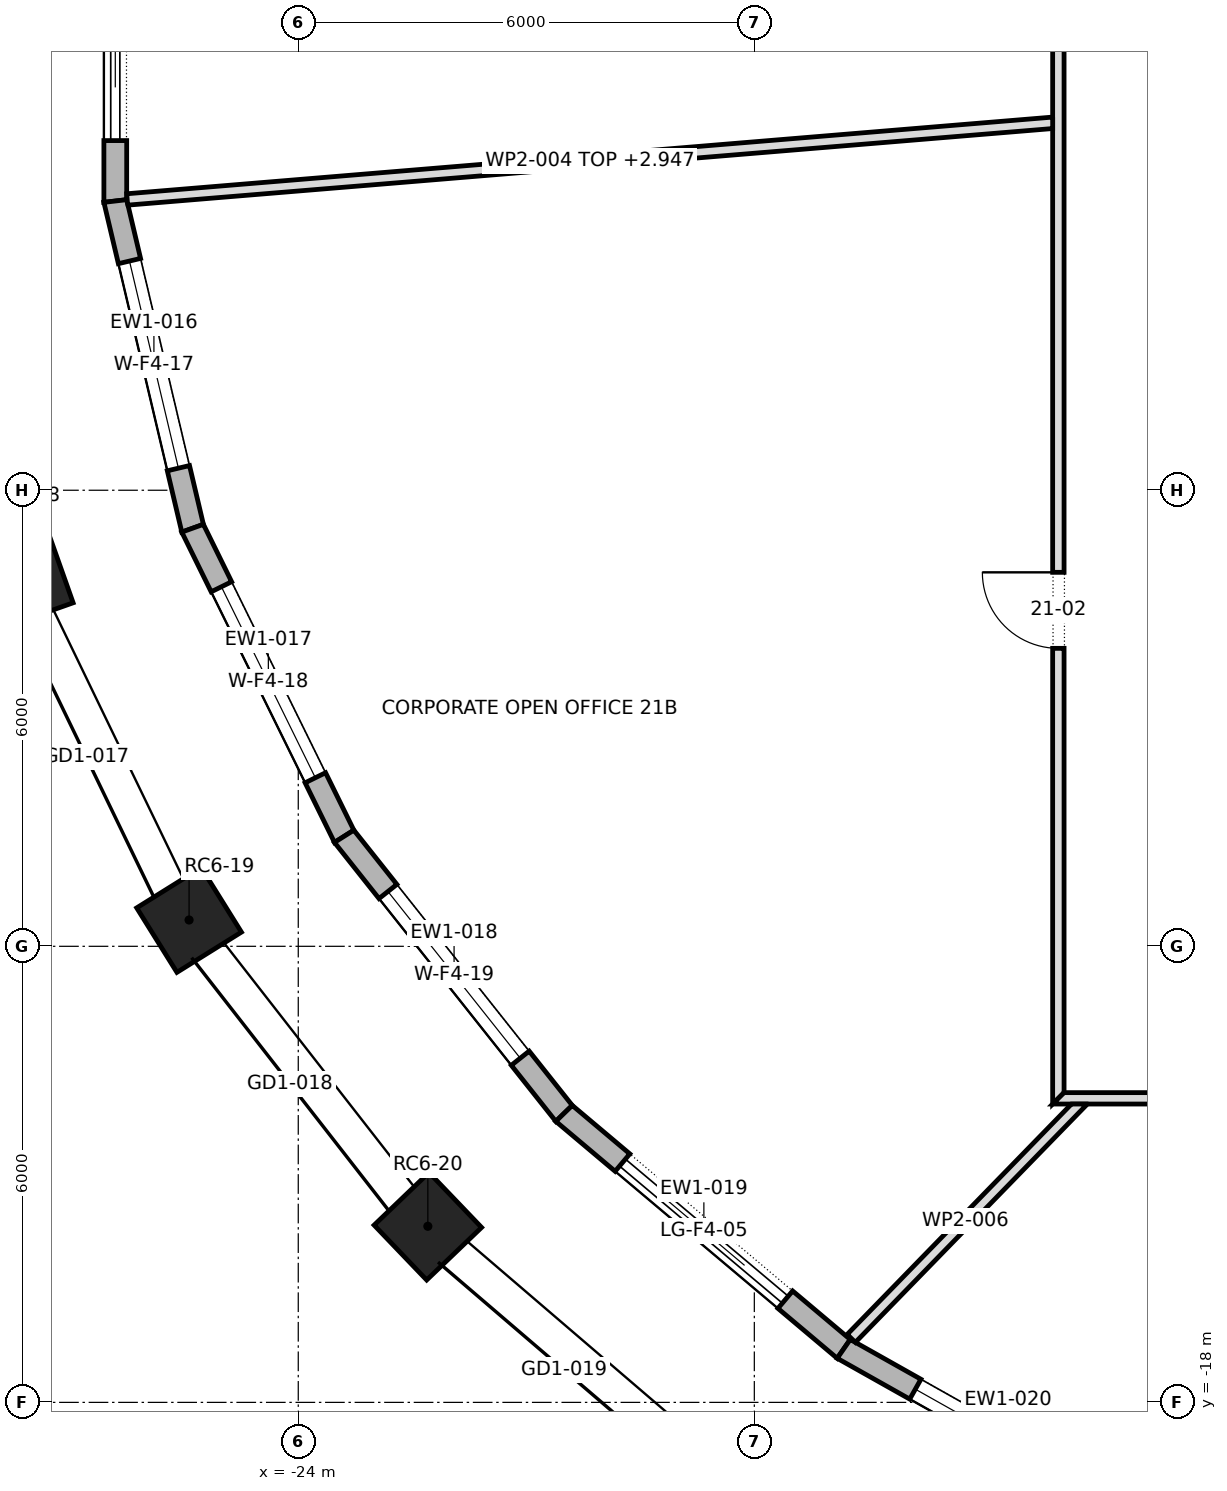
"""IFC4 building model, lengths in metres.
Left out: names, types, materials, properties, quantities, classifications, styles, units other than length and angle.
Written with IfcOpenShell. Run it as: python <this file> out.ifc"""

import sys

from ifc_helpers import new_model, si_unit, direction, frame, frame_2d, origin, origin_2d, place, context, subcontext, project, spatial, polyline, rectangle, outline, extrude, element, fill, save


model = new_model("IFC4")
c1 = context("Model", 3, precision=1e-05, world=origin(), true_north=direction((0.0, 1.0)))
c2 = subcontext(c1, "Body", "Model", "MODEL_VIEW")
j1 = project(units=[si_unit("LENGTHUNIT", "METRE"), si_unit("PLANEANGLEUNIT", "RADIAN")], contexts=[c1])
p1 = place(None, origin())
s1 = spatial("IfcSite", under=j1, at=p1, CompositionType="ELEMENT")
p2 = place(p1, origin())
s2 = spatial("IfcBuilding", under=s1, at=p2, CompositionType="ELEMENT")
p3 = place(p2, frame((0.0, 0.0, 300.3)))
s3 = spatial("IfcBuildingStorey", under=s2, at=p3, CompositionType="ELEMENT", Elevation=300.3)
for number, where, z_axis, x_axis in (
    (1, (-27.6, -7.177, 0.0), (0.0, 0.0, 1.0), (0.334, -0.943, 0.0)),
    (2, (-25.437, -11.654, 0.0), (0.0, 0.0, 1.0), (0.529, -0.849, 0.0)),
    (3, (-22.295, -15.683, 0.0), (0.0, 0.0, 1.0), (0.692, -0.722, 0.0)),
):
    element("IfcColumn", number, at=place(p3, frame(where, z_axis=z_axis, x_axis=x_axis)), inside=s3, PredefinedType="COLUMN", context=c2, shape_type="SweptSolid", body=[
        extrude(rectangle(XDim=1.0, YDim=1.0, at=origin_2d()), origin(), (0.0, 0.0, 1.0), 4.0),
    ])
p4 = place(p3, frame((-26.407, 2.195, 0.0), z_axis=(0.0, 0.0, 1.0), x_axis=(0.0, -1.0, 0.0)))
e4 = element("IfcWall", 4, at=p4, inside=s3, PredefinedType="STANDARD", context=c2, shape_type="SweptSolid", body=[
    extrude(outline(polyline([(-0.018, -0.15), (4.408, -0.15), (4.373, 0.15), (0.018, 0.15), (-0.018, -0.15)])), origin(), (0.0, 0.0, 1.0), 3.7),
])
p5 = place(p4, frame((0.795, 0.0, 0.0)))
e5 = element("IfcOpeningElement", 5, at=p5, cuts=e4, PredefinedType="OPENING", context=c2, shape_type="SweptSolid", body=[
    extrude(rectangle(XDim=2.8, YDim=3.25, at=frame_2d((1.4, 1.625))), frame((0.0, 0.162, 0.0), z_axis=(0.0, -1.0, 0.0), x_axis=(1.0, 0.0, 0.0)), (0.0, 0.0, 1.0), 0.324),
])
p6 = place(p3, frame((-26.407, -2.195, 0.0), z_axis=(0.0, 0.0, 1.0), x_axis=(0.229943714271, -0.973203929435, 0.0)))
e6 = element("IfcWall", 6, at=p6, inside=s3, PredefinedType="STANDARD", context=c2, shape_type="SweptSolid", body=[
    extrude(outline(polyline([(-0.018, -0.15), (4.44, -0.15), (4.406, 0.15), (0.018, 0.15), (-0.018, -0.15)])), origin(), (0.0, 0.0, 1.0), 3.7),
])
p7 = place(p6, frame((0.812, 0.0, 0.6)))
e7 = element("IfcOpeningElement", 7, at=p7, cuts=e6, PredefinedType="OPENING", context=c2, shape_type="SweptSolid", body=[
    extrude(rectangle(XDim=2.8, YDim=2.65, at=frame_2d((1.4, 1.325))), frame((0.0, 0.162, 0.0), z_axis=(0.0, -1.0, 0.0), x_axis=(1.0, 0.0, 0.0)), (0.0, 0.0, 1.0), 0.324),
])
p8 = place(p3, frame((-25.39, -6.5, 0.0), z_axis=(0.0, 0.0, 1.0), x_axis=(0.441431671743, -0.897294867467, 0.0)))
e8 = element("IfcWall", 8, at=p8, inside=s3, PredefinedType="STANDARD", context=c2, shape_type="SweptSolid", body=[
    extrude(outline(polyline([(-0.017, -0.15), (4.533, -0.15), (4.501, 0.15), (0.017, 0.15), (-0.017, -0.15)])), origin(), (0.0, 0.0, 1.0), 3.7),
])
p9 = place(p8, frame((0.858, 0.0, 0.6)))
e9 = element("IfcOpeningElement", 9, at=p9, cuts=e8, PredefinedType="OPENING", context=c2, shape_type="SweptSolid", body=[
    extrude(rectangle(XDim=2.8, YDim=2.65, at=frame_2d((1.4, 1.325))), frame((0.0, 0.162, 0.0), z_axis=(0.0, -1.0, 0.0), x_axis=(1.0, 0.0, 0.0)), (0.0, 0.0, 1.0), 0.324),
])
p10 = place(p3, frame((-23.396, -10.553, 0.0), z_axis=(0.0, 0.0, 1.0), x_axis=(0.621625671247, -0.783314448256, 0.0)))
e10 = element("IfcWall", 10, at=p10, inside=s3, PredefinedType="STANDARD", context=c2, shape_type="SweptSolid", body=[
    extrude(outline(polyline([(-0.016, -0.15), (4.669, -0.15), (4.638, 0.15), (0.016, 0.15), (-0.016, -0.15)])), origin(), (0.0, 0.0, 1.0), 3.7),
])
p11 = place(p10, frame((0.927, 0.0, 0.6)))
e11 = element("IfcOpeningElement", 11, at=p11, cuts=e10, PredefinedType="OPENING", context=c2, shape_type="SweptSolid", body=[
    extrude(rectangle(XDim=2.8, YDim=2.65, at=frame_2d((1.4, 1.325))), frame((0.0, 0.162, 0.0), z_axis=(0.0, -1.0, 0.0), x_axis=(1.0, 0.0, 0.0)), (0.0, 0.0, 1.0), 0.324),
])
p12 = place(p3, frame((-20.503, -14.198, 0.0), z_axis=(0.0, 0.0, 1.0), x_axis=(0.764966473721, -0.644070100286, 0.0)))
e12 = element("IfcWall", 12, at=p12, inside=s3, PredefinedType="STANDARD", context=c2, shape_type="SweptSolid", body=[
    extrude(outline(polyline([(-0.015, -0.15), (4.824, -0.15), (4.796, 0.15), (0.015, 0.15), (-0.015, -0.15)])), origin(), (0.0, 0.0, 1.0), 3.7),
])
p13 = place(p12, frame((1.005, 0.0, 0.0)))
e13 = element("IfcOpeningElement", 13, at=p13, cuts=e12, PredefinedType="OPENING", context=c2, shape_type="SweptSolid", body=[
    extrude(rectangle(XDim=2.8, YDim=3.25, at=frame_2d((1.4, 1.625))), frame((0.0, 0.162, 0.0), z_axis=(0.0, -1.0, 0.0), x_axis=(1.0, 0.0, 0.0)), (0.0, 0.0, 1.0), 0.324),
])
p14 = place(p3, frame((-16.824, -17.296, 0.0), z_axis=(0.0, 0.0, 1.0), x_axis=(0.871512454536, -0.490373369575, 0.0)))
e14 = element("IfcWall", 14, at=p14, inside=s3, PredefinedType="STANDARD", context=c2, shape_type="SweptSolid", body=[
    extrude(outline(polyline([(-0.014, -0.15), (4.975, -0.15), (4.948, 0.15), (0.014, 0.15), (-0.014, -0.15)])), origin(), (0.0, 0.0, 1.0), 3.7),
])
p15 = place(p14, frame((1.081, 0.0, 0.6)))
e15 = element("IfcOpeningElement", 15, at=p15, cuts=e14, PredefinedType="OPENING", context=c2, shape_type="SweptSolid", body=[
    extrude(rectangle(XDim=2.8, YDim=2.65, at=frame_2d((1.4, 1.325))), frame((0.0, 0.162, 0.0), z_axis=(0.0, -1.0, 0.0), x_axis=(1.0, 0.0, 0.0)), (0.0, 0.0, 1.0), 0.324),
])
p16 = place(p3, frame((-14.0, -14.075, 0.0), z_axis=(0.0, 0.0, 1.0), x_axis=(0.0, 1.0, 0.0)))
e16 = element("IfcWall", 16, at=p16, inside=s3, PredefinedType="PARTITIONING", context=c2, shape_type="SweptSolid", body=[
    extrude(outline(polyline([(0.15, -0.075), (2.139, -0.075), (4.128, -0.075), (6.118, -0.075), (8.107, -0.075), (10.096, -0.075), (12.086, -0.075), (14.075, -0.075), (16.064, -0.075), (18.053, -0.075), (20.043, -0.075), (22.032, -0.075), (24.021, -0.075), (26.011, -0.075), (28.0, -0.075), (28.15, 0.075), (26.273, 0.075), (24.396, 0.075), (22.52, 0.075), (20.643, 0.075), (18.767, 0.075), (16.89, 0.075), (15.013, 0.075), (13.137, 0.075), (11.26, 0.075), (9.383, 0.075), (7.507, 0.075), (5.63, 0.075), (3.753, 0.075), (1.877, 0.075), (0.0, 0.075), (0.15, -0.075)])), origin(), (0.0, 0.0, 1.0), 3.7),
])
p17 = place(p16, frame((17.43, 0.0, 0.0)))
e17 = element("IfcOpeningElement", 17, at=p17, cuts=e16, PredefinedType="OPENING", context=c2, shape_type="SweptSolid", body=[
    extrude(rectangle(XDim=1.8, YDim=2.1, at=frame_2d((0.9, 1.05))), frame((0.0, 0.087, 0.0), z_axis=(0.0, -1.0, 0.0), x_axis=(1.0, 0.0, 0.0)), (0.0, 0.0, 1.0), 0.174),
])
p18 = place(p16, frame((5.995, 0.0, 0.0)))
e18 = element("IfcOpeningElement", 18, at=p18, cuts=e16, PredefinedType="OPENING", context=c2, shape_type="SweptSolid", body=[
    extrude(rectangle(XDim=1.0, YDim=2.1, at=frame_2d((0.5, 1.05))), frame((0.0, 0.087, 0.0), z_axis=(0.0, -1.0, 0.0), x_axis=(1.0, 0.0, 0.0)), (0.0, 0.0, 1.0), 0.174),
])
p19 = place(p3, frame((-14.075, -14.0, 0.0), z_axis=(0.0, 0.0, 1.0), x_axis=(1.0, 0.0, 0.0)))
e19 = element("IfcWall", 19, at=p19, inside=s3, PredefinedType="PARTITIONING", context=c2, shape_type="SweptSolid", body=[
    extrude(outline(polyline([(0.0, -0.075), (1.877, -0.075), (3.753, -0.075), (5.63, -0.075), (7.507, -0.075), (9.383, -0.075), (11.26, -0.075), (13.137, -0.075), (15.013, -0.075), (16.89, -0.075), (18.767, -0.075), (20.643, -0.075), (22.52, -0.075), (24.396, -0.075), (26.273, -0.075), (28.15, -0.075), (28.0, 0.075), (26.011, 0.075), (24.021, 0.075), (22.032, 0.075), (20.043, 0.075), (18.053, 0.075), (16.064, 0.075), (14.075, 0.075), (12.086, 0.075), (10.096, 0.075), (8.107, 0.075), (6.118, 0.075), (4.128, 0.075), (2.139, 0.075), (0.15, 0.075), (0.0, -0.075)])), origin(), (0.0, 0.0, 1.0), 3.7),
])
p20 = place(p19, frame((5.93, 0.0, 0.0)))
e20 = element("IfcOpeningElement", 20, at=p20, cuts=e19, PredefinedType="OPENING", context=c2, shape_type="SweptSolid", body=[
    extrude(rectangle(XDim=1.0, YDim=2.1, at=frame_2d((0.5, 1.05))), frame((0.0, 0.087, 0.0), z_axis=(0.0, -1.0, 0.0), x_axis=(1.0, 0.0, 0.0)), (0.0, 0.0, 1.0), 0.174),
])
p21 = place(p19, frame((17.2, 0.0, 0.0)))
e21 = element("IfcOpeningElement", 21, at=p21, cuts=e19, PredefinedType="OPENING", context=c2, shape_type="SweptSolid", body=[
    extrude(rectangle(XDim=1.0, YDim=2.1, at=frame_2d((0.5, 1.05))), frame((0.0, 0.087, 0.0), z_axis=(0.0, -1.0, 0.0), x_axis=(1.0, 0.0, 0.0)), (0.0, 0.0, 1.0), 0.174),
])
p22 = place(p3, frame((-14.069, -1.166, 0.0), z_axis=(0.0, 0.0, 1.0), x_axis=(-0.99659010846, -0.082511549014, 0.0)))
e22 = element("IfcWall", 22, at=p22, inside=s3, PredefinedType="PARTITIONING", context=c2, shape_type="SweptSolid", body=[
    extrude(outline(polyline([(12.223, -0.075), (12.223, 0.047), (12.219, 0.075), (10.475, 0.075), (8.731, 0.075), (6.987, 0.075), (5.243, 0.075), (3.5, 0.075), (1.756, 0.075), (0.012, 0.075), (0.0, -0.069), (0.0, -0.075), (1.746, -0.075), (3.492, -0.075), (5.239, -0.075), (6.985, -0.075), (8.731, -0.075), (10.477, -0.075), (12.223, -0.075)])), origin(), (0.0, 0.0, 1.0), 2.947),
])
p23 = place(p3, frame((-13.672, -14.023, 0.0), z_axis=(0.0, 0.0, 1.0), x_axis=(-0.697528481307, -0.716557058277, 0.0)))
e23 = element("IfcWall", 23, at=p23, inside=s3, PredefinedType="PARTITIONING", context=c2, shape_type="SweptSolid", body=[
    extrude(outline(polyline([(0.0, 0.075), (0.0, 0.075), (0.146, -0.075), (1.555, -0.075), (2.965, -0.075), (4.375, -0.075), (4.375, 0.075), (2.917, 0.075), (1.458, 0.075), (0.0, 0.075)])), origin(), (0.0, 0.0, 1.0), 3.7),
])
p24 = place(p5, origin())
e24 = element("IfcDoor", 24, at=p24, inside=s3, OperationType="DOUBLE_DOOR_SLIDING", PredefinedType="DOOR", context=c2, shape_type="SweptSolid", body=[
    extrude(rectangle(XDim=2.8, YDim=3.25, at=frame_2d((1.4, 1.625))), frame((0.0, 0.025, 0.0), z_axis=(0.0, -1.0, 0.0), x_axis=(1.0, 0.0, 0.0)), (0.0, 0.0, 1.0), 0.05),
])
fill(e5, e24)
p25 = place(p7, origin())
e25 = element("IfcWindow", 25, at=p25, inside=s3, PartitioningType="DOUBLE_PANEL_VERTICAL", PredefinedType="WINDOW", context=c2, shape_type="SweptSolid", body=[
    extrude(rectangle(XDim=2.8, YDim=2.65, at=frame_2d((1.4, 1.325))), frame((0.0, 0.03, 0.0), z_axis=(0.0, -1.0, 0.0), x_axis=(1.0, 0.0, 0.0)), (0.0, 0.0, 1.0), 0.06),
])
fill(e7, e25)
p26 = place(p9, origin())
e26 = element("IfcWindow", 26, at=p26, inside=s3, PartitioningType="DOUBLE_PANEL_VERTICAL", PredefinedType="WINDOW", context=c2, shape_type="SweptSolid", body=[
    extrude(rectangle(XDim=2.8, YDim=2.65, at=frame_2d((1.4, 1.325))), frame((0.0, 0.03, 0.0), z_axis=(0.0, -1.0, 0.0), x_axis=(1.0, 0.0, 0.0)), (0.0, 0.0, 1.0), 0.06),
])
fill(e9, e26)
p27 = place(p11, origin())
e27 = element("IfcWindow", 27, at=p27, inside=s3, PartitioningType="DOUBLE_PANEL_VERTICAL", PredefinedType="WINDOW", context=c2, shape_type="SweptSolid", body=[
    extrude(rectangle(XDim=2.8, YDim=2.65, at=frame_2d((1.4, 1.325))), frame((0.0, 0.03, 0.0), z_axis=(0.0, -1.0, 0.0), x_axis=(1.0, 0.0, 0.0)), (0.0, 0.0, 1.0), 0.06),
])
fill(e11, e27)
p28 = place(p13, origin())
e28 = element("IfcDoor", 28, at=p28, inside=s3, OperationType="DOUBLE_DOOR_SLIDING", PredefinedType="DOOR", context=c2, shape_type="SweptSolid", body=[
    extrude(rectangle(XDim=2.8, YDim=3.25, at=frame_2d((1.4, 1.625))), frame((0.0, 0.025, 0.0), z_axis=(0.0, -1.0, 0.0), x_axis=(1.0, 0.0, 0.0)), (0.0, 0.0, 1.0), 0.05),
])
fill(e13, e28)
p29 = place(p15, origin())
e29 = element("IfcWindow", 29, at=p29, inside=s3, PartitioningType="DOUBLE_PANEL_VERTICAL", PredefinedType="WINDOW", context=c2, shape_type="SweptSolid", body=[
    extrude(rectangle(XDim=2.8, YDim=2.65, at=frame_2d((1.4, 1.325))), frame((0.0, 0.03, 0.0), z_axis=(0.0, -1.0, 0.0), x_axis=(1.0, 0.0, 0.0)), (0.0, 0.0, 1.0), 0.06),
])
fill(e15, e29)
p30 = place(p18, origin())
e30 = element("IfcDoor", 30, at=p30, inside=s3, OperationType="SINGLE_SWING_LEFT", PredefinedType="DOOR", context=c2, shape_type="SweptSolid", body=[
    extrude(rectangle(XDim=1.0, YDim=2.1, at=frame_2d((0.5, 1.05))), frame((0.0, 0.025, 0.0), z_axis=(0.0, -1.0, 0.0), x_axis=(1.0, 0.0, 0.0)), (0.0, 0.0, 1.0), 0.05),
])
fill(e18, e30)
save(model, sys.argv[1])
